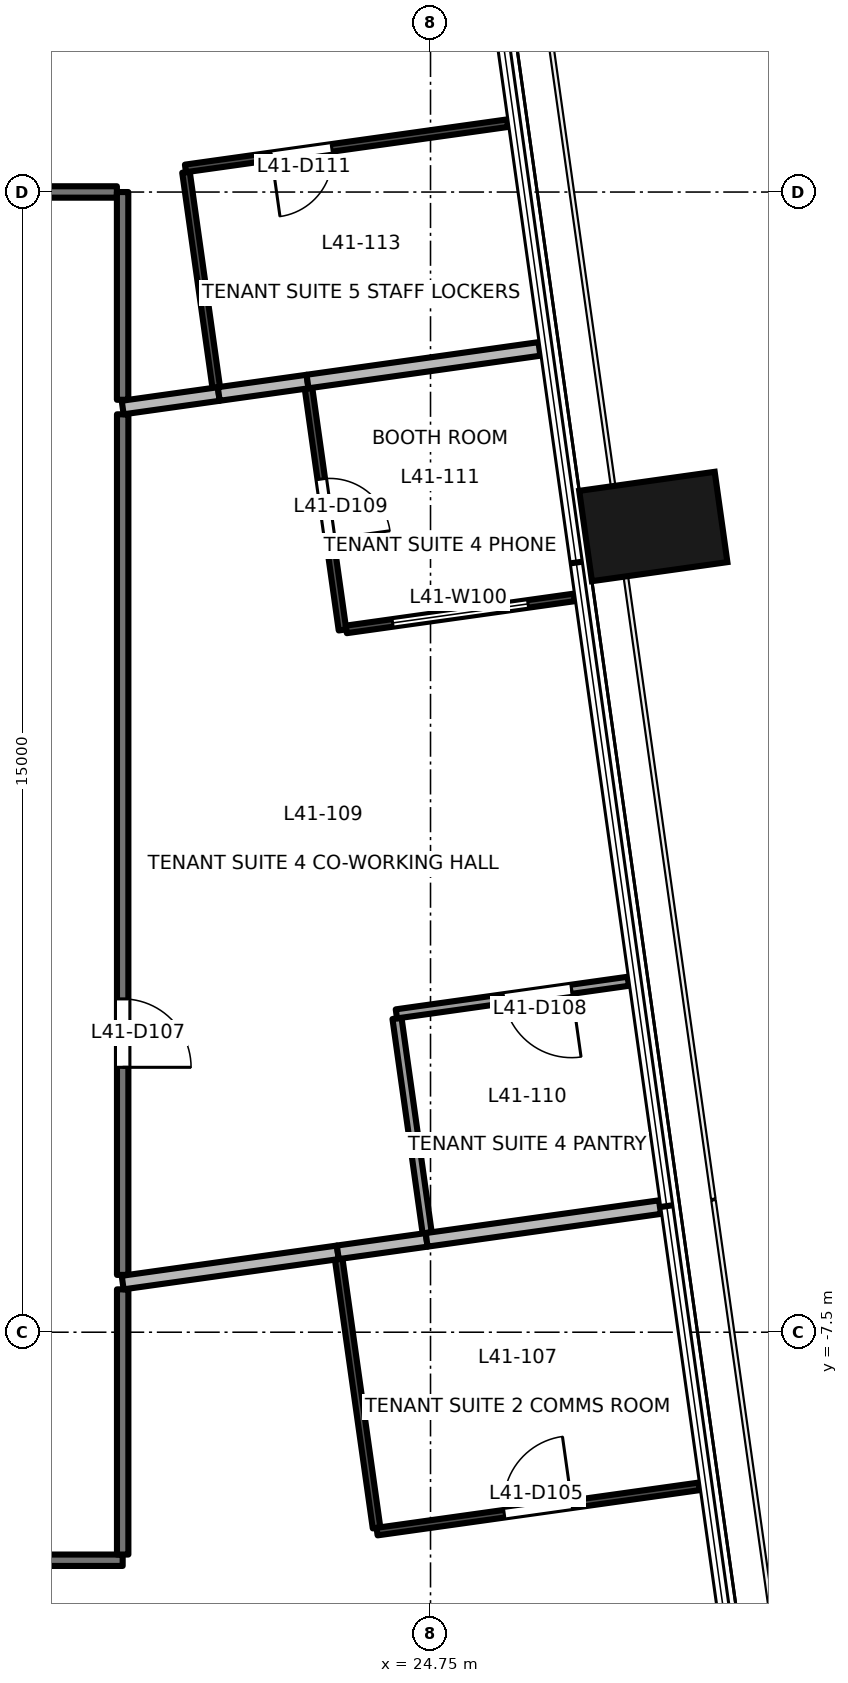
"""IFC4 building model, lengths in metres.
Left out: names, types, materials, properties, quantities, classifications, styles, units other than length and angle.
Written with IfcOpenShell. Run it as: python <this file> out.ifc"""

import sys

from ifc_helpers import new_model, si_unit, direction, frame, frame_2d, origin, origin_2d, place, context, subcontext, project, spatial, rectangle, extrude, element, fill, save


model = new_model("IFC4")
c1 = context("Model", 3, precision=1e-05, world=origin(), true_north=direction((0.0, 1.0)))
c2 = subcontext(c1, "Body", "Model", "MODEL_VIEW")
j1 = project(units=[si_unit("LENGTHUNIT", "METRE"), si_unit("PLANEANGLEUNIT", "RADIAN")], contexts=[c1])
p1 = place(None, origin())
s1 = spatial("IfcSite", under=j1, at=p1, CompositionType="ELEMENT")
p2 = place(p1, origin())
s2 = spatial("IfcBuilding", under=s1, at=p2, CompositionType="ELEMENT")
p3 = place(p2, frame((0.0, 0.0, 180.2)))
s3 = spatial("IfcBuildingStorey", under=s2, at=p3, CompositionType="ELEMENT", Elevation=180.2)
p4 = place(p3, frame((27.681, 3.1, -0.2), z_axis=(0.0, 0.0, 1.0), x_axis=(-0.139190384377, 0.990265639562, 0.0)))
e1 = element("IfcColumn", 1, at=p4, inside=s3, PredefinedType="COLUMN", context=c2, shape_type="SweptSolid", body=[
    extrude(rectangle(XDim=1.2, YDim=1.8, at=origin_2d()), origin(), (0.0, 0.0, 1.0), 3.9),
])
p5 = place(p3, frame((20.7, -10.5, 0.0), z_axis=(0.0, 0.0, 1.0), x_axis=(-1.0, 0.0, 0.0)))
e2 = element("IfcWall", 2, at=p5, inside=s3, PredefinedType="PARTITIONING", context=c2, shape_type="SweptSolid", body=[
    extrude(rectangle(XDim=7.251, YDim=0.15, at=frame_2d((3.625, 0.0))), origin(), (0.0, 0.0, 1.0), 3.1),
])
p6 = place(p3, frame((20.7, -6.936, 0.0), z_axis=(0.0, 0.0, 1.0), x_axis=(0.0, -1.0, 0.0)))
e3 = element("IfcWall", 3, at=p6, inside=s3, PredefinedType="PARTITIONING", context=c2, shape_type="SweptSolid", body=[
    extrude(rectangle(XDim=3.489, YDim=0.15, at=frame_2d((1.745, 0.0))), origin(), (0.0, 0.0, 1.0), 3.7),
])
p7 = place(p3, frame((20.7, 4.576, 0.0), z_axis=(0.0, 0.0, 1.0), x_axis=(0.0, -1.0, 0.0)))
e4 = element("IfcWall", 4, at=p7, inside=s3, PredefinedType="PARTITIONING", context=c2, shape_type="SweptSolid", body=[
    extrude(rectangle(XDim=11.322, YDim=0.15, at=frame_2d((5.661, 0.0))), origin(), (0.0, 0.0, 1.0), 3.25),
])
p8 = place(p7, frame((7.691, 0.0, 0.0)))
e5 = element("IfcOpeningElement", 5, at=p8, cuts=e4, PredefinedType="OPENING", context=c2, shape_type="SweptSolid", body=[
    extrude(rectangle(XDim=0.9, YDim=2.1, at=frame_2d((0.45, 1.05))), frame((0.0, 0.085, 0.0), z_axis=(0.0, -1.0, 0.0), x_axis=(1.0, 0.0, 0.0)), (0.0, 0.0, 1.0), 0.171),
])
p9 = place(p3, frame((18.0, 7.501, 0.0), z_axis=(0.0, 0.0, 1.0), x_axis=(1.0, 0.0, 0.0)))
e6 = element("IfcWall", 6, at=p9, inside=s3, PredefinedType="PARTITIONING", context=c2, shape_type="SweptSolid", body=[
    extrude(rectangle(XDim=2.624, YDim=0.15, at=frame_2d((1.312, 0.0))), origin(), (0.0, 0.0, 1.0), 3.7),
])
p10 = place(p3, frame((20.699, 7.5, 0.0), z_axis=(0.0, 0.0, 1.0), x_axis=(0.0, -1.0, 0.0)))
e7 = element("IfcWall", 7, at=p10, inside=s3, PredefinedType="PARTITIONING", context=c2, shape_type="SweptSolid", body=[
    extrude(rectangle(XDim=2.733, YDim=0.15, at=frame_2d((1.366, 0.0))), origin(), (0.0, 0.0, 1.0), 3.7),
])
p11 = place(p3, frame((23.542, -6.538, 0.0), z_axis=(0.0, 0.0, 1.0), x_axis=(0.139477964322, -0.990225175134, 0.0)))
e8 = element("IfcWall", 8, at=p11, inside=s3, PredefinedType="PARTITIONING", context=c2, shape_type="SweptSolid", body=[
    extrude(rectangle(XDim=3.571, YDim=0.1, at=frame_2d((1.785, 0.0))), origin(), (0.0, 0.0, 1.0), 3.7),
])
p12 = place(p3, frame((24.047, -10.123, 0.0), z_axis=(0.0, 0.0, 1.0), x_axis=(0.990283364174, 0.139064224876, 0.0)))
e9 = element("IfcWall", 9, at=p12, inside=s3, PredefinedType="PARTITIONING", context=c2, shape_type="SweptSolid", body=[
    extrude(rectangle(XDim=4.278, YDim=0.1, at=frame_2d((2.139, 0.0))), origin(), (0.0, 0.0, 1.0), 3.7),
])
p13 = place(p12, frame((1.689, 0.0, 0.0)))
e10 = element("IfcOpeningElement", 10, at=p13, cuts=e9, PredefinedType="OPENING", context=c2, shape_type="SweptSolid", body=[
    extrude(rectangle(XDim=0.9, YDim=2.1, at=frame_2d((0.45, 1.05))), frame((0.0, 0.061, 0.0), z_axis=(0.0, -1.0, 0.0), x_axis=(1.0, 0.0, 0.0)), (0.0, 0.0, 1.0), 0.121),
])
p14 = place(p3, frame((20.7, -6.847, 0.0), z_axis=(0.0, 0.0, 1.0), x_axis=(0.990258051292, 0.139244360214, 0.0)))
e11 = element("IfcWall", 11, at=p14, inside=s3, PredefinedType="PARTITIONING", context=c2, shape_type="SweptSolid", body=[
    extrude(rectangle(XDim=2.858, YDim=0.18, at=frame_2d((1.429, 0.0))), origin(), (0.0, 0.0, 1.0), 3.7),
])
p15 = place(p3, frame((23.53, -6.449, 0.0), z_axis=(0.0, 0.0, 1.0), x_axis=(0.990293977152, 0.138988628372, 0.0)))
e12 = element("IfcWall", 12, at=p15, inside=s3, PredefinedType="PARTITIONING", context=c2, shape_type="SweptSolid", body=[
    extrude(rectangle(XDim=1.18, YDim=0.18, at=frame_2d((0.59, 0.0))), origin(), (0.0, 0.0, 1.0), 3.7),
])
p16 = place(p3, frame((24.699, -6.285, 0.0), z_axis=(0.0, 0.0, 1.0), x_axis=(0.990293026317, 0.138995402899, 0.0)))
e13 = element("IfcWall", 13, at=p16, inside=s3, PredefinedType="PARTITIONING", context=c2, shape_type="SweptSolid", body=[
    extrude(rectangle(XDim=3.1, YDim=0.18, at=frame_2d((1.55, 0.0))), origin(), (0.0, 0.0, 1.0), 3.7),
])
p17 = place(p3, frame((24.309, -3.371, 0.0), z_axis=(0.0, 0.0, 1.0), x_axis=(0.139298147854, -0.990250486495, 0.0)))
e14 = element("IfcWall", 14, at=p17, inside=s3, PredefinedType="PARTITIONING", context=c2, shape_type="SweptSolid", body=[
    extrude(rectangle(XDim=2.85, YDim=0.12, at=frame_2d((1.425, 0.0))), origin(), (0.0, 0.0, 1.0), 3.25),
])
p18 = place(p3, frame((27.352, -2.883, 0.0), z_axis=(0.0, 0.0, 1.0), x_axis=(-0.990260846741, -0.139224478493, 0.0)))
e15 = element("IfcWall", 15, at=p18, inside=s3, PredefinedType="PARTITIONING", context=c2, shape_type="SweptSolid", body=[
    extrude(rectangle(XDim=3.081, YDim=0.12, at=frame_2d((1.541, 0.0))), origin(), (0.0, 0.0, 1.0), 3.7),
])
p19 = place(p18, frame((0.754, 0.0, 0.0)))
e16 = element("IfcOpeningElement", 16, at=p19, cuts=e15, PredefinedType="OPENING", context=c2, shape_type="SweptSolid", body=[
    extrude(rectangle(XDim=0.9, YDim=2.1, at=frame_2d((0.45, 1.05))), frame((0.0, 0.071, 0.0), z_axis=(0.0, -1.0, 0.0), x_axis=(1.0, 0.0, 0.0)), (0.0, 0.0, 1.0), 0.141),
])
p20 = place(p3, frame((23.145, 4.918, 0.0), z_axis=(0.0, 0.0, 1.0), x_axis=(0.139249005145, -0.990257398138, 0.0)))
e17 = element("IfcWall", 17, at=p20, inside=s3, PredefinedType="PARTITIONING", context=c2, shape_type="SweptSolid", body=[
    extrude(rectangle(XDim=3.21, YDim=0.1, at=frame_2d((1.605, 0.0))), origin(), (0.0, 0.0, 1.0), 3.25),
])
p21 = place(p20, frame((1.205, 0.0, 0.0)))
e18 = element("IfcOpeningElement", 18, at=p21, cuts=e17, PredefinedType="OPENING", context=c2, shape_type="SweptSolid", body=[
    extrude(rectangle(XDim=0.8, YDim=2.1, at=frame_2d((0.4, 1.05))), frame((0.0, 0.061, 0.0), z_axis=(0.0, -1.0, 0.0), x_axis=(1.0, 0.0, 0.0)), (0.0, 0.0, 1.0), 0.121),
])
p22 = place(p3, frame((23.642, 1.746, 0.0), z_axis=(0.0, 0.0, 1.0), x_axis=(0.990294755806, 0.138983080349, 0.0)))
e19 = element("IfcWall", 19, at=p22, inside=s3, PredefinedType="PARTITIONING", context=c2, shape_type="SweptSolid", body=[
    extrude(rectangle(XDim=3.028, YDim=0.1, at=frame_2d((1.514, 0.0))), origin(), (0.0, 0.0, 1.0), 3.7),
])
p23 = place(p22, frame((0.615, 0.0, 0.9)))
e20 = element("IfcOpeningElement", 20, at=p23, cuts=e19, PredefinedType="OPENING", context=c2, shape_type="SweptSolid", body=[
    extrude(rectangle(XDim=1.8, YDim=1.2, at=frame_2d((0.9, 0.6))), frame((0.0, 0.061, 0.0), z_axis=(0.0, -1.0, 0.0), x_axis=(1.0, 0.0, 0.0)), (0.0, 0.0, 1.0), 0.121),
])
p24 = place(p3, frame((20.7, 4.665, 0.0), z_axis=(0.0, 0.0, 1.0), x_axis=(0.99023431529, 0.139413058294, 0.0)))
e21 = element("IfcWall", 21, at=p24, inside=s3, PredefinedType="PARTITIONING", context=c2, shape_type="SweptSolid", body=[
    extrude(rectangle(XDim=1.277, YDim=0.18, at=frame_2d((0.638, 0.0))), origin(), (0.0, 0.0, 1.0), 3.25),
])
p25 = place(p3, frame((21.964, 4.843, 0.0), z_axis=(0.0, 0.0, 1.0), x_axis=(0.990277975586, 0.139102591888, 0.0)))
e22 = element("IfcWall", 22, at=p25, inside=s3, PredefinedType="PARTITIONING", context=c2, shape_type="SweptSolid", body=[
    extrude(rectangle(XDim=1.179, YDim=0.18, at=frame_2d((0.59, 0.0))), origin(), (0.0, 0.0, 1.0), 3.7),
])
p26 = place(p3, frame((23.132, 5.007, 0.0), z_axis=(0.0, 0.0, 1.0), x_axis=(0.990260846741, 0.139224478493, 0.0)))
e23 = element("IfcWall", 23, at=p26, inside=s3, PredefinedType="PARTITIONING", context=c2, shape_type="SweptSolid", body=[
    extrude(rectangle(XDim=3.081, YDim=0.18, at=frame_2d((1.541, 0.0))), origin(), (0.0, 0.0, 1.0), 3.7),
])
p27 = place(p3, frame((21.533, 7.761, 0.0), z_axis=(0.0, 0.0, 1.0), x_axis=(0.139150189669, -0.990271288443, 0.0)))
e24 = element("IfcWall", 24, at=p27, inside=s3, PredefinedType="PARTITIONING", context=c2, shape_type="SweptSolid", body=[
    extrude(rectangle(XDim=2.86, YDim=0.1, at=frame_2d((1.43, 0.0))), origin(), (0.0, 0.0, 1.0), 3.7),
])
p28 = place(p3, frame((25.764, 8.406, 0.0), z_axis=(0.0, 0.0, 1.0), x_axis=(-0.99028887957, -0.139024943805, 0.0)))
e25 = element("IfcWall", 25, at=p28, inside=s3, PredefinedType="PARTITIONING", context=c2, shape_type="SweptSolid", body=[
    extrude(rectangle(XDim=4.28, YDim=0.1, at=frame_2d((2.14, 0.0))), origin(), (0.0, 0.0, 1.0), 3.7),
])
p29 = place(p28, frame((2.336, 0.0, 0.0)))
e26 = element("IfcOpeningElement", 26, at=p29, cuts=e25, PredefinedType="OPENING", context=c2, shape_type="SweptSolid", body=[
    extrude(rectangle(XDim=0.8, YDim=2.1, at=frame_2d((0.4, 1.05))), frame((0.0, 0.061, 0.0), z_axis=(0.0, -1.0, 0.0), x_axis=(1.0, 0.0, 0.0)), (0.0, 0.0, 1.0), 0.121),
])
p30 = place(p13, origin())
e27 = element("IfcDoor", 27, at=p30, inside=s3, OperationType="SINGLE_SWING_RIGHT", PredefinedType="DOOR", context=c2, shape_type="SweptSolid", body=[
    extrude(rectangle(XDim=0.9, YDim=2.1, at=frame_2d((0.45, 1.05))), frame((0.0, 0.025, 0.0), z_axis=(0.0, -1.0, 0.0), x_axis=(1.0, 0.0, 0.0)), (0.0, 0.0, 1.0), 0.05),
])
fill(e10, e27)
p31 = place(p8, origin())
e28 = element("IfcDoor", 28, at=p31, inside=s3, OperationType="SINGLE_SWING_RIGHT", PredefinedType="DOOR", context=c2, shape_type="SweptSolid", body=[
    extrude(rectangle(XDim=0.9, YDim=2.1, at=frame_2d((0.45, 1.05))), frame((0.0, 0.025, 0.0), z_axis=(0.0, -1.0, 0.0), x_axis=(1.0, 0.0, 0.0)), (0.0, 0.0, 1.0), 0.05),
])
fill(e5, e28)
p32 = place(p19, origin())
e29 = element("IfcDoor", 29, at=p32, inside=s3, OperationType="SINGLE_SWING_LEFT", PredefinedType="DOOR", context=c2, shape_type="SweptSolid", body=[
    extrude(rectangle(XDim=0.9, YDim=2.1, at=frame_2d((0.45, 1.05))), frame((0.0, 0.025, 0.0), z_axis=(0.0, -1.0, 0.0), x_axis=(1.0, 0.0, 0.0)), (0.0, 0.0, 1.0), 0.05),
])
fill(e16, e29)
p33 = place(p21, origin())
e30 = element("IfcDoor", 30, at=p33, inside=s3, OperationType="SINGLE_SWING_RIGHT", PredefinedType="DOOR", context=c2, shape_type="SweptSolid", body=[
    extrude(rectangle(XDim=0.8, YDim=2.1, at=frame_2d((0.4, 1.05))), frame((0.0, 0.025, 0.0), z_axis=(0.0, -1.0, 0.0), x_axis=(1.0, 0.0, 0.0)), (0.0, 0.0, 1.0), 0.05),
])
fill(e18, e30)
p34 = place(p29, origin())
e31 = element("IfcDoor", 31, at=p34, inside=s3, OperationType="SINGLE_SWING_RIGHT", PredefinedType="DOOR", context=c2, shape_type="SweptSolid", body=[
    extrude(rectangle(XDim=0.8, YDim=2.1, at=frame_2d((0.4, 1.05))), frame((0.0, 0.025, 0.0), z_axis=(0.0, -1.0, 0.0), x_axis=(1.0, 0.0, 0.0)), (0.0, 0.0, 1.0), 0.05),
])
fill(e26, e31)
p35 = place(p23, origin())
e32 = element("IfcWindow", 32, at=p35, inside=s3, PartitioningType="SINGLE_PANEL", PredefinedType="WINDOW", context=c2, shape_type="SweptSolid", body=[
    extrude(rectangle(XDim=1.8, YDim=1.2, at=frame_2d((0.9, 0.6))), frame((0.0, 0.03, 0.0), z_axis=(0.0, -1.0, 0.0), x_axis=(1.0, 0.0, 0.0)), (0.0, 0.0, 1.0), 0.06),
])
fill(e20, e32)
save(model, sys.argv[1])
